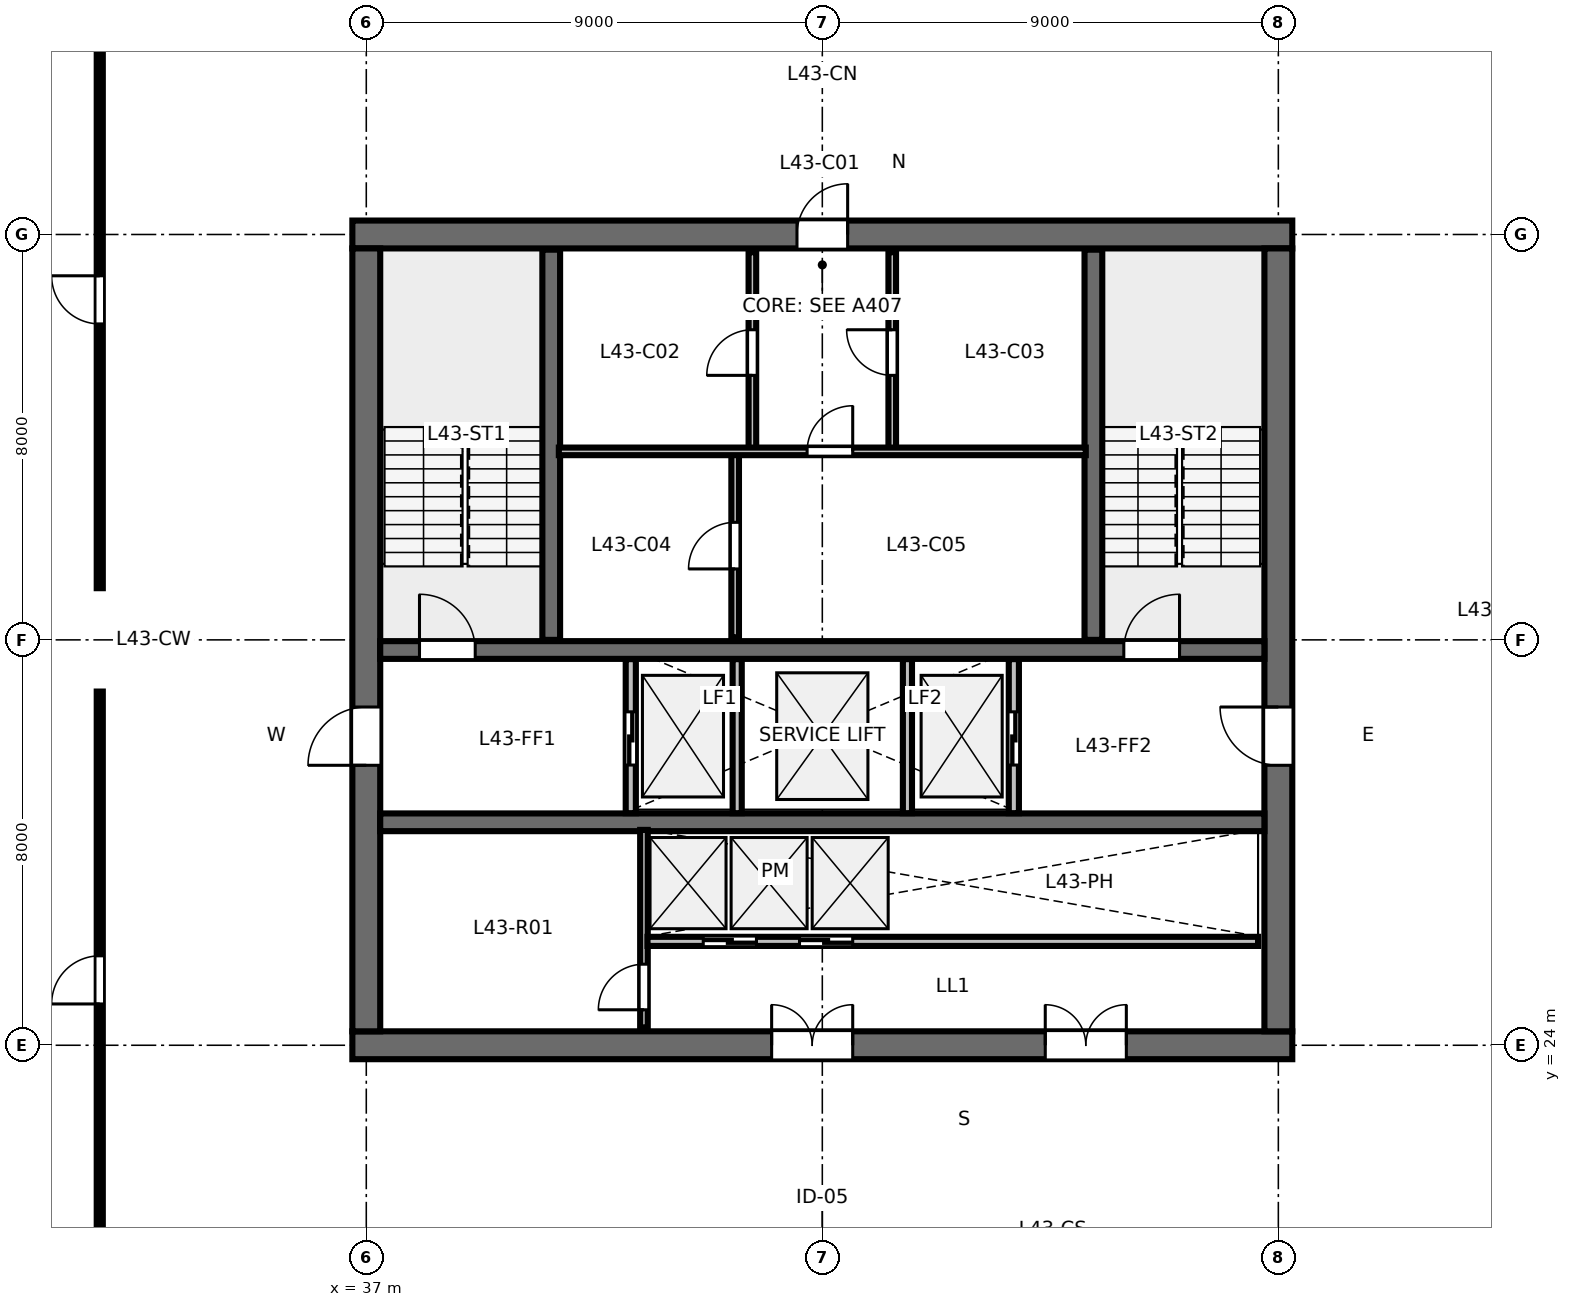
"""IFC4 building model, lengths in metres.
Left out: names, types, materials, properties, quantities, classifications, styles, units other than length and angle.
Written with IfcOpenShell. Run it as: python <this file> out.ifc"""

import sys

from ifc_helpers import new_model, si_unit, direction, frame, frame_2d, origin, place, context, subcontext, project, spatial, rectangle, extrude, element, fill, save


model = new_model("IFC4")
c1 = context("Model", 3, precision=1e-05, world=origin(), true_north=direction((0.0, 1.0)))
c2 = subcontext(c1, "Body", "Model", "MODEL_VIEW")
j1 = project(units=[si_unit("LENGTHUNIT", "METRE"), si_unit("PLANEANGLEUNIT", "RADIAN")], contexts=[c1])
p1 = place(None, origin())
s1 = spatial("IfcSite", under=j1, at=p1, CompositionType="ELEMENT")
p2 = place(p1, origin())
s2 = spatial("IfcBuilding", under=s1, at=p2, CompositionType="ELEMENT")
p3 = place(p2, frame((0.0, 0.0, 163.6)))
s3 = spatial("IfcBuildingStorey", under=s2, at=p3, CompositionType="ELEMENT", Elevation=163.6)
p4 = place(p3, frame((36.725, 24.0, 0.0), z_axis=(0.0, 0.0, 1.0), x_axis=(1.0, 0.0, 0.0)))
e1 = element("IfcWall", 1, at=p4, inside=s3, PredefinedType="SHEAR", context=c2, shape_type="SweptSolid", body=[
    extrude(rectangle(XDim=18.55, YDim=0.55, at=frame_2d((9.275, 0.0))), origin(), (0.0, 0.0, 1.0), 3.28),
])
p5 = place(p4, frame((8.275, 0.0, 0.0)))
e2 = element("IfcOpeningElement", 2, at=p5, cuts=e1, PredefinedType="OPENING", context=c2, shape_type="SweptSolid", body=[
    extrude(rectangle(XDim=1.6, YDim=2.15, at=frame_2d((0.8, 1.075))), frame((0.0, 0.285, 0.0), z_axis=(0.0, -1.0, 0.0), x_axis=(1.0, 0.0, 0.0)), (0.0, 0.0, 1.0), 0.57),
])
p6 = place(p4, frame((13.675, 0.0, 0.0)))
e3 = element("IfcOpeningElement", 3, at=p6, cuts=e1, PredefinedType="OPENING", context=c2, shape_type="SweptSolid", body=[
    extrude(rectangle(XDim=1.6, YDim=2.15, at=frame_2d((0.8, 1.075))), frame((0.0, 0.285, 0.0), z_axis=(0.0, -1.0, 0.0), x_axis=(1.0, 0.0, 0.0)), (0.0, 0.0, 1.0), 0.57),
])
p7 = place(p3, frame((36.725, 40.0, 0.0), z_axis=(0.0, 0.0, 1.0), x_axis=(1.0, 0.0, 0.0)))
e4 = element("IfcWall", 4, at=p7, inside=s3, PredefinedType="SHEAR", context=c2, shape_type="SweptSolid", body=[
    extrude(rectangle(XDim=18.55, YDim=0.55, at=frame_2d((9.275, 0.0))), origin(), (0.0, 0.0, 1.0), 3.28),
])
p8 = place(p7, frame((8.775, 0.0, 0.0)))
e5 = element("IfcOpeningElement", 5, at=p8, cuts=e4, PredefinedType="OPENING", context=c2, shape_type="SweptSolid", body=[
    extrude(rectangle(XDim=1.0, YDim=2.15, at=frame_2d((0.5, 1.075))), frame((0.0, 0.285, 0.0), z_axis=(0.0, -1.0, 0.0), x_axis=(1.0, 0.0, 0.0)), (0.0, 0.0, 1.0), 0.57),
])
p9 = place(p3, frame((37.0, 24.275, 0.0), z_axis=(0.0, 0.0, 1.0), x_axis=(0.0, 1.0, 0.0)))
e6 = element("IfcWall", 6, at=p9, inside=s3, PredefinedType="SHEAR", context=c2, shape_type="SweptSolid", body=[
    extrude(rectangle(XDim=15.45, YDim=0.55, at=frame_2d((7.725, 0.0))), origin(), (0.0, 0.0, 1.0), 3.28),
])
p10 = place(p9, frame((5.25, 0.0, 0.0)))
e7 = element("IfcOpeningElement", 7, at=p10, cuts=e6, PredefinedType="OPENING", context=c2, shape_type="SweptSolid", body=[
    extrude(rectangle(XDim=1.15, YDim=2.15, at=frame_2d((0.575, 1.075))), frame((0.0, 0.285, 0.0), z_axis=(0.0, -1.0, 0.0), x_axis=(1.0, 0.0, 0.0)), (0.0, 0.0, 1.0), 0.57),
])
p11 = place(p3, frame((55.0, 24.275, 0.0), z_axis=(0.0, 0.0, 1.0), x_axis=(0.0, 1.0, 0.0)))
e8 = element("IfcWall", 8, at=p11, inside=s3, PredefinedType="SHEAR", context=c2, shape_type="SweptSolid", body=[
    extrude(rectangle(XDim=15.45, YDim=0.55, at=frame_2d((7.725, 0.0))), origin(), (0.0, 0.0, 1.0), 3.28),
])
p12 = place(p11, frame((5.25, 0.0, 0.0)))
e9 = element("IfcOpeningElement", 9, at=p12, cuts=e8, PredefinedType="OPENING", context=c2, shape_type="SweptSolid", body=[
    extrude(rectangle(XDim=1.15, YDim=2.15, at=frame_2d((0.575, 1.075))), frame((0.0, 0.285, 0.0), z_axis=(0.0, -1.0, 0.0), x_axis=(1.0, 0.0, 0.0)), (0.0, 0.0, 1.0), 0.57),
])
p13 = place(p3, frame((37.275, 31.8, 0.0), z_axis=(0.0, 0.0, 1.0), x_axis=(1.0, 0.0, 0.0)))
e10 = element("IfcWall", 10, at=p13, inside=s3, PredefinedType="SHEAR", context=c2, shape_type="SweptSolid", body=[
    extrude(rectangle(XDim=17.45, YDim=0.35, at=frame_2d((8.725, 0.0))), origin(), (0.0, 0.0, 1.0), 3.28),
])
p14 = place(p13, frame((0.775, 0.0, 0.0)))
e11 = element("IfcOpeningElement", 11, at=p14, cuts=e10, PredefinedType="OPENING", context=c2, shape_type="SweptSolid", body=[
    extrude(rectangle(XDim=1.1, YDim=2.15, at=frame_2d((0.55, 1.075))), frame((0.0, 0.185, 0.0), z_axis=(0.0, -1.0, 0.0), x_axis=(1.0, 0.0, 0.0)), (0.0, 0.0, 1.0), 0.37),
])
p15 = place(p13, frame((14.675, 0.0, 0.0)))
e12 = element("IfcOpeningElement", 12, at=p15, cuts=e10, PredefinedType="OPENING", context=c2, shape_type="SweptSolid", body=[
    extrude(rectangle(XDim=1.1, YDim=2.15, at=frame_2d((0.55, 1.075))), frame((0.0, 0.185, 0.0), z_axis=(0.0, -1.0, 0.0), x_axis=(1.0, 0.0, 0.0)), (0.0, 0.0, 1.0), 0.37),
])
p16 = place(p3, frame((37.275, 28.4, 0.0), z_axis=(0.0, 0.0, 1.0), x_axis=(1.0, 0.0, 0.0)))
e13 = element("IfcWall", 13, at=p16, inside=s3, PredefinedType="SHEAR", context=c2, shape_type="SweptSolid", body=[
    extrude(rectangle(XDim=17.45, YDim=0.35, at=frame_2d((8.725, 0.0))), origin(), (0.0, 0.0, 1.0), 3.28),
])
for number, where, z_axis, x_axis in (
    (14, (40.65, 32.0, 0.0), (0.0, 0.0, 1.0), (0.0, 1.0, 0.0)),
    (15, (51.35, 32.0, 0.0), (0.0, 0.0, 1.0), (0.0, 1.0, 0.0)),
):
    element("IfcWall", number, at=place(p3, frame(where, z_axis=z_axis, x_axis=x_axis)), inside=s3, PredefinedType="SHEAR", context=c2, shape_type="SweptSolid", body=[
        extrude(rectangle(XDim=7.7, YDim=0.35, at=frame_2d((3.85, 0.0))), origin(), (0.0, 0.0, 1.0), 3.6),
    ])
p17 = place(p3, frame((44.62, 35.72, 0.0), z_axis=(0.0, 0.0, 1.0), x_axis=(0.0, 1.0, 0.0)))
e16 = element("IfcWall", 16, at=p17, inside=s3, PredefinedType="PARTITIONING", context=c2, shape_type="SweptSolid", body=[
    extrude(rectangle(XDim=3.93, YDim=0.15, at=frame_2d((1.965, 0.0))), origin(), (0.0, 0.0, 1.0), 3.28),
])
p18 = place(p17, frame((1.5, 0.0, 0.0)))
e17 = element("IfcOpeningElement", 17, at=p18, cuts=e16, PredefinedType="OPENING", context=c2, shape_type="SweptSolid", body=[
    extrude(rectangle(XDim=0.9, YDim=2.15, at=frame_2d((0.45, 1.075))), frame((0.0, 0.085, 0.0), z_axis=(0.0, -1.0, 0.0), x_axis=(1.0, 0.0, 0.0)), (0.0, 0.0, 1.0), 0.17),
])
p19 = place(p3, frame((47.38, 35.72, 0.0), z_axis=(0.0, 0.0, 1.0), x_axis=(0.0, 1.0, 0.0)))
e18 = element("IfcWall", 18, at=p19, inside=s3, PredefinedType="PARTITIONING", context=c2, shape_type="SweptSolid", body=[
    extrude(rectangle(XDim=3.93, YDim=0.15, at=frame_2d((1.965, 0.0))), origin(), (0.0, 0.0, 1.0), 3.28),
])
p20 = place(p19, frame((1.5, 0.0, 0.0)))
e19 = element("IfcOpeningElement", 19, at=p20, cuts=e18, PredefinedType="OPENING", context=c2, shape_type="SweptSolid", body=[
    extrude(rectangle(XDim=0.9, YDim=2.15, at=frame_2d((0.45, 1.075))), frame((0.0, 0.085, 0.0), z_axis=(0.0, -1.0, 0.0), x_axis=(1.0, 0.0, 0.0)), (0.0, 0.0, 1.0), 0.17),
])
p21 = place(p3, frame((44.28, 32.05, 0.0), z_axis=(0.0, 0.0, 1.0), x_axis=(0.0, 1.0, 0.0)))
e20 = element("IfcWall", 20, at=p21, inside=s3, PredefinedType="PARTITIONING", context=c2, shape_type="SweptSolid", body=[
    extrude(rectangle(XDim=3.67, YDim=0.15, at=frame_2d((1.835, 0.0))), origin(), (0.0, 0.0, 1.0), 3.28),
])
p22 = place(p21, frame((1.35, 0.0, 0.0)))
e21 = element("IfcOpeningElement", 21, at=p22, cuts=e20, PredefinedType="OPENING", context=c2, shape_type="SweptSolid", body=[
    extrude(rectangle(XDim=0.92, YDim=2.15, at=frame_2d((0.46, 1.075))), frame((0.0, 0.085, 0.0), z_axis=(0.0, -1.0, 0.0), x_axis=(1.0, 0.0, 0.0)), (0.0, 0.0, 1.0), 0.17),
])
p23 = place(p3, frame((40.8, 35.72, 0.0), z_axis=(0.0, 0.0, 1.0), x_axis=(1.0, 0.0, 0.0)))
e22 = element("IfcWall", 22, at=p23, inside=s3, PredefinedType="PARTITIONING", context=c2, shape_type="SweptSolid", body=[
    extrude(rectangle(XDim=10.4, YDim=0.15, at=frame_2d((5.2, 0.0))), origin(), (0.0, 0.0, 1.0), 3.28),
])
p24 = place(p23, frame((4.9, 0.0, 0.0)))
e23 = element("IfcOpeningElement", 23, at=p24, cuts=e22, PredefinedType="OPENING", context=c2, shape_type="SweptSolid", body=[
    extrude(rectangle(XDim=0.9, YDim=2.15, at=frame_2d((0.45, 1.075))), frame((0.0, 0.085, 0.0), z_axis=(0.0, -1.0, 0.0), x_axis=(1.0, 0.0, 0.0)), (0.0, 0.0, 1.0), 0.17),
])
p25 = place(p3, frame((42.22, 28.58, 0.0), z_axis=(0.0, 0.0, 1.0), x_axis=(0.0, 1.0, 0.0)))
e24 = element("IfcWall", 24, at=p25, inside=s3, PredefinedType="PARTITIONING", context=c2, shape_type="SweptSolid", body=[
    extrude(rectangle(XDim=3.04, YDim=0.2, at=frame_2d((1.52, 0.0))), origin(), (0.0, 0.0, 1.0), 3.28),
])
p26 = place(p25, frame((0.95, 0.0, 0.0)))
e25 = element("IfcOpeningElement", 25, at=p26, cuts=e24, PredefinedType="OPENING", context=c2, shape_type="SweptSolid", body=[
    extrude(rectangle(XDim=1.05, YDim=2.15, at=frame_2d((0.525, 1.075))), frame((0.0, 0.11, 0.0), z_axis=(0.0, -1.0, 0.0), x_axis=(1.0, 0.0, 0.0)), (0.0, 0.0, 1.0), 0.22),
])
p27 = place(p3, frame((49.78, 28.58, 0.0), z_axis=(0.0, 0.0, 1.0), x_axis=(0.0, 1.0, 0.0)))
e26 = element("IfcWall", 26, at=p27, inside=s3, PredefinedType="PARTITIONING", context=c2, shape_type="SweptSolid", body=[
    extrude(rectangle(XDim=3.04, YDim=0.2, at=frame_2d((1.52, 0.0))), origin(), (0.0, 0.0, 1.0), 3.28),
])
p28 = place(p27, frame((0.95, 0.0, 0.0)))
e27 = element("IfcOpeningElement", 27, at=p28, cuts=e26, PredefinedType="OPENING", context=c2, shape_type="SweptSolid", body=[
    extrude(rectangle(XDim=1.05, YDim=2.15, at=frame_2d((0.525, 1.075))), frame((0.0, 0.11, 0.0), z_axis=(0.0, -1.0, 0.0), x_axis=(1.0, 0.0, 0.0)), (0.0, 0.0, 1.0), 0.22),
])
for number, where, z_axis, x_axis in (
    (28, (44.32, 28.58, 0.0), (0.0, 0.0, 1.0), (0.0, 1.0, 0.0)),
    (29, (47.68, 28.58, 0.0), (0.0, 0.0, 1.0), (0.0, 1.0, 0.0)),
):
    element("IfcWall", number, at=place(p3, frame(where, z_axis=z_axis, x_axis=x_axis)), inside=s3, PredefinedType="PARTITIONING", context=c2, shape_type="SweptSolid", body=[
        extrude(rectangle(XDim=3.04, YDim=0.18, at=frame_2d((1.52, 0.0))), origin(), (0.0, 0.0, 1.0), 3.28),
    ])
p29 = place(p3, frame((42.48, 24.35, 0.0), z_axis=(0.0, 0.0, 1.0), x_axis=(0.0, 1.0, 0.0)))
e30 = element("IfcWall", 30, at=p29, inside=s3, PredefinedType="PARTITIONING", context=c2, shape_type="SweptSolid", body=[
    extrude(rectangle(XDim=3.9, YDim=0.15, at=frame_2d((1.95, 0.0))), origin(), (0.0, 0.0, 1.0), 3.28),
])
p30 = place(p29, frame((0.35, 0.0, 0.0)))
e31 = element("IfcOpeningElement", 31, at=p30, cuts=e30, PredefinedType="OPENING", context=c2, shape_type="SweptSolid", body=[
    extrude(rectangle(XDim=0.9, YDim=2.15, at=frame_2d((0.45, 1.075))), frame((0.0, 0.085, 0.0), z_axis=(0.0, -1.0, 0.0), x_axis=(1.0, 0.0, 0.0)), (0.0, 0.0, 1.0), 0.17),
])
p31 = place(p3, frame((42.55, 26.05, 0.0), z_axis=(0.0, 0.0, 1.0), x_axis=(1.0, 0.0, 0.0)))
e32 = element("IfcWall", 32, at=p31, inside=s3, PredefinedType="PARTITIONING", context=c2, shape_type="SweptSolid", body=[
    extrude(rectangle(XDim=12.05, YDim=0.18, at=frame_2d((6.025, 0.0))), origin(), (0.0, 0.0, 1.0), 3.28),
])
p32 = place(p31, frame((1.1, 0.0, 0.0)))
e33 = element("IfcOpeningElement", 33, at=p32, cuts=e32, PredefinedType="OPENING", context=c2, shape_type="SweptSolid", body=[
    extrude(rectangle(XDim=1.05, YDim=2.15, at=frame_2d((0.525, 1.075))), frame((0.0, 0.1, 0.0), z_axis=(0.0, -1.0, 0.0), x_axis=(1.0, 0.0, 0.0)), (0.0, 0.0, 1.0), 0.2),
])
p33 = place(p31, frame((3.0, 0.0, 0.0)))
e34 = element("IfcOpeningElement", 34, at=p33, cuts=e32, PredefinedType="OPENING", context=c2, shape_type="SweptSolid", body=[
    extrude(rectangle(XDim=1.05, YDim=2.15, at=frame_2d((0.525, 1.075))), frame((0.0, 0.1, 0.0), z_axis=(0.0, -1.0, 0.0), x_axis=(1.0, 0.0, 0.0)), (0.0, 0.0, 1.0), 0.2),
])
p34 = place(p3, frame((31.74, 19.4, 0.0), z_axis=(0.0, 0.0, 1.0), x_axis=(0.0, 1.0, 0.0)))
e35 = element("IfcWall", 35, at=p34, inside=s3, PredefinedType="PARTITIONING", context=c2, shape_type="SweptSolid", body=[
    extrude(rectangle(XDim=11.58, YDim=0.12, at=frame_2d((5.79, 0.0))), origin(), (0.0, 0.0, 1.0), 2.56),
])
p35 = place(p34, frame((5.415, 0.0, 0.0)))
e36 = element("IfcOpeningElement", 36, at=p35, cuts=e35, PredefinedType="OPENING", context=c2, shape_type="SweptSolid", body=[
    extrude(rectangle(XDim=0.95, YDim=2.15, at=frame_2d((0.475, 1.075))), frame((0.0, 0.07, 0.0), z_axis=(0.0, -1.0, 0.0), x_axis=(1.0, 0.0, 0.0)), (0.0, 0.0, 1.0), 0.14),
])
p36 = place(p3, frame((31.74, 33.02, 0.0), z_axis=(0.0, 0.0, 1.0), x_axis=(0.0, 1.0, 0.0)))
e37 = element("IfcWall", 37, at=p36, inside=s3, PredefinedType="PARTITIONING", context=c2, shape_type="SweptSolid", body=[
    extrude(rectangle(XDim=11.58, YDim=0.12, at=frame_2d((5.79, 0.0))), origin(), (0.0, 0.0, 1.0), 2.56),
])
p37 = place(p36, frame((5.215, 0.0, 0.0)))
e38 = element("IfcOpeningElement", 38, at=p37, cuts=e37, PredefinedType="OPENING", context=c2, shape_type="SweptSolid", body=[
    extrude(rectangle(XDim=0.95, YDim=2.15, at=frame_2d((0.475, 1.075))), frame((0.0, 0.07, 0.0), z_axis=(0.0, -1.0, 0.0), x_axis=(1.0, 0.0, 0.0)), (0.0, 0.0, 1.0), 0.14),
])
p38 = place(p14, origin())
e39 = element("IfcDoor", 39, at=p38, inside=s3, OperationType="SINGLE_SWING_LEFT", PredefinedType="DOOR", context=c2, shape_type="SweptSolid", body=[
    extrude(rectangle(XDim=1.1, YDim=2.15, at=frame_2d((0.55, 1.075))), frame((0.0, 0.025, 0.0), z_axis=(0.0, -1.0, 0.0), x_axis=(1.0, 0.0, 0.0)), (0.0, 0.0, 1.0), 0.05),
])
fill(e11, e39)
p39 = place(p15, origin())
e40 = element("IfcDoor", 40, at=p39, inside=s3, OperationType="SINGLE_SWING_RIGHT", PredefinedType="DOOR", context=c2, shape_type="SweptSolid", body=[
    extrude(rectangle(XDim=1.1, YDim=2.15, at=frame_2d((0.55, 1.075))), frame((0.0, 0.025, 0.0), z_axis=(0.0, -1.0, 0.0), x_axis=(1.0, 0.0, 0.0)), (0.0, 0.0, 1.0), 0.05),
])
fill(e12, e40)
p40 = place(p8, origin())
e41 = element("IfcDoor", 41, at=p40, inside=s3, OperationType="SINGLE_SWING_RIGHT", PredefinedType="DOOR", context=c2, shape_type="SweptSolid", body=[
    extrude(rectangle(XDim=1.0, YDim=2.15, at=frame_2d((0.5, 1.075))), frame((0.0, 0.025, 0.0), z_axis=(0.0, -1.0, 0.0), x_axis=(1.0, 0.0, 0.0)), (0.0, 0.0, 1.0), 0.05),
])
fill(e5, e41)
p41 = place(p10, origin())
e42 = element("IfcDoor", 42, at=p41, inside=s3, OperationType="SINGLE_SWING_LEFT", PredefinedType="DOOR", context=c2, shape_type="SweptSolid", body=[
    extrude(rectangle(XDim=1.15, YDim=2.15, at=frame_2d((0.575, 1.075))), frame((0.0, 0.025, 0.0), z_axis=(0.0, -1.0, 0.0), x_axis=(1.0, 0.0, 0.0)), (0.0, 0.0, 1.0), 0.05),
])
fill(e7, e42)
p42 = place(p12, origin())
e43 = element("IfcDoor", 43, at=p42, inside=s3, OperationType="SINGLE_SWING_RIGHT", PredefinedType="DOOR", context=c2, shape_type="SweptSolid", body=[
    extrude(rectangle(XDim=1.15, YDim=2.15, at=frame_2d((0.575, 1.075))), frame((0.0, 0.025, 0.0), z_axis=(0.0, -1.0, 0.0), x_axis=(1.0, 0.0, 0.0)), (0.0, 0.0, 1.0), 0.05),
])
fill(e9, e43)
p43 = place(p5, origin())
e44 = element("IfcDoor", 44, at=p43, inside=s3, OperationType="DOUBLE_DOOR_SINGLE_SWING", PredefinedType="DOOR", context=c2, shape_type="SweptSolid", body=[
    extrude(rectangle(XDim=1.6, YDim=2.15, at=frame_2d((0.8, 1.075))), frame((0.0, 0.025, 0.0), z_axis=(0.0, -1.0, 0.0), x_axis=(1.0, 0.0, 0.0)), (0.0, 0.0, 1.0), 0.05),
])
fill(e2, e44)
p44 = place(p6, origin())
e45 = element("IfcDoor", 45, at=p44, inside=s3, OperationType="DOUBLE_DOOR_SINGLE_SWING", PredefinedType="DOOR", context=c2, shape_type="SweptSolid", body=[
    extrude(rectangle(XDim=1.6, YDim=2.15, at=frame_2d((0.8, 1.075))), frame((0.0, 0.025, 0.0), z_axis=(0.0, -1.0, 0.0), x_axis=(1.0, 0.0, 0.0)), (0.0, 0.0, 1.0), 0.05),
])
fill(e3, e45)
p45 = place(p18, origin())
e46 = element("IfcDoor", 46, at=p45, inside=s3, OperationType="SINGLE_SWING_LEFT", PredefinedType="DOOR", context=c2, shape_type="SweptSolid", body=[
    extrude(rectangle(XDim=0.9, YDim=2.15, at=frame_2d((0.45, 1.075))), frame((0.0, 0.025, 0.0), z_axis=(0.0, -1.0, 0.0), x_axis=(1.0, 0.0, 0.0)), (0.0, 0.0, 1.0), 0.05),
])
fill(e17, e46)
p46 = place(p20, origin())
e47 = element("IfcDoor", 47, at=p46, inside=s3, OperationType="SINGLE_SWING_RIGHT", PredefinedType="DOOR", context=c2, shape_type="SweptSolid", body=[
    extrude(rectangle(XDim=0.9, YDim=2.15, at=frame_2d((0.45, 1.075))), frame((0.0, 0.025, 0.0), z_axis=(0.0, -1.0, 0.0), x_axis=(1.0, 0.0, 0.0)), (0.0, 0.0, 1.0), 0.05),
])
fill(e19, e47)
p47 = place(p22, origin())
e48 = element("IfcDoor", 48, at=p47, inside=s3, OperationType="SINGLE_SWING_LEFT", PredefinedType="DOOR", context=c2, shape_type="SweptSolid", body=[
    extrude(rectangle(XDim=0.92, YDim=2.15, at=frame_2d((0.46, 1.075))), frame((0.0, 0.025, 0.0), z_axis=(0.0, -1.0, 0.0), x_axis=(1.0, 0.0, 0.0)), (0.0, 0.0, 1.0), 0.05),
])
fill(e21, e48)
p48 = place(p24, origin())
e49 = element("IfcDoor", 49, at=p48, inside=s3, OperationType="SINGLE_SWING_RIGHT", PredefinedType="DOOR", context=c2, shape_type="SweptSolid", body=[
    extrude(rectangle(XDim=0.9, YDim=2.15, at=frame_2d((0.45, 1.075))), frame((0.0, 0.025, 0.0), z_axis=(0.0, -1.0, 0.0), x_axis=(1.0, 0.0, 0.0)), (0.0, 0.0, 1.0), 0.05),
])
fill(e23, e49)
p49 = place(p26, origin())
e50 = element("IfcDoor", 50, at=p49, inside=s3, OperationType="SLIDING_TO_LEFT", PredefinedType="DOOR", context=c2, shape_type="SweptSolid", body=[
    extrude(rectangle(XDim=1.05, YDim=2.15, at=frame_2d((0.525, 1.075))), frame((0.0, 0.025, 0.0), z_axis=(0.0, -1.0, 0.0), x_axis=(1.0, 0.0, 0.0)), (0.0, 0.0, 1.0), 0.05),
])
fill(e25, e50)
p50 = place(p28, origin())
e51 = element("IfcDoor", 51, at=p50, inside=s3, OperationType="SLIDING_TO_RIGHT", PredefinedType="DOOR", context=c2, shape_type="SweptSolid", body=[
    extrude(rectangle(XDim=1.05, YDim=2.15, at=frame_2d((0.525, 1.075))), frame((0.0, 0.025, 0.0), z_axis=(0.0, -1.0, 0.0), x_axis=(1.0, 0.0, 0.0)), (0.0, 0.0, 1.0), 0.05),
])
fill(e27, e51)
p51 = place(p30, origin())
e52 = element("IfcDoor", 52, at=p51, inside=s3, OperationType="SINGLE_SWING_LEFT", PredefinedType="DOOR", context=c2, shape_type="SweptSolid", body=[
    extrude(rectangle(XDim=0.9, YDim=2.15, at=frame_2d((0.45, 1.075))), frame((0.0, 0.025, 0.0), z_axis=(0.0, -1.0, 0.0), x_axis=(1.0, 0.0, 0.0)), (0.0, 0.0, 1.0), 0.05),
])
fill(e31, e52)
p52 = place(p32, origin())
e53 = element("IfcDoor", 53, at=p52, inside=s3, OperationType="SLIDING_TO_LEFT", PredefinedType="DOOR", context=c2, shape_type="SweptSolid", body=[
    extrude(rectangle(XDim=1.05, YDim=2.15, at=frame_2d((0.525, 1.075))), frame((0.0, 0.025, 0.0), z_axis=(0.0, -1.0, 0.0), x_axis=(1.0, 0.0, 0.0)), (0.0, 0.0, 1.0), 0.05),
])
fill(e33, e53)
p53 = place(p33, origin())
e54 = element("IfcDoor", 54, at=p53, inside=s3, OperationType="SLIDING_TO_RIGHT", PredefinedType="DOOR", context=c2, shape_type="SweptSolid", body=[
    extrude(rectangle(XDim=1.05, YDim=2.15, at=frame_2d((0.525, 1.075))), frame((0.0, 0.025, 0.0), z_axis=(0.0, -1.0, 0.0), x_axis=(1.0, 0.0, 0.0)), (0.0, 0.0, 1.0), 0.05),
])
fill(e34, e54)
p54 = place(p35, origin())
e55 = element("IfcDoor", 55, at=p54, inside=s3, OperationType="SINGLE_SWING_LEFT", PredefinedType="DOOR", context=c2, shape_type="SweptSolid", body=[
    extrude(rectangle(XDim=0.95, YDim=2.15, at=frame_2d((0.475, 1.075))), frame((0.0, 0.025, 0.0), z_axis=(0.0, -1.0, 0.0), x_axis=(1.0, 0.0, 0.0)), (0.0, 0.0, 1.0), 0.05),
])
fill(e36, e55)
p55 = place(p37, origin())
e56 = element("IfcDoor", 56, at=p55, inside=s3, OperationType="SINGLE_SWING_RIGHT", PredefinedType="DOOR", context=c2, shape_type="SweptSolid", body=[
    extrude(rectangle(XDim=0.95, YDim=2.15, at=frame_2d((0.475, 1.075))), frame((0.0, 0.025, 0.0), z_axis=(0.0, -1.0, 0.0), x_axis=(1.0, 0.0, 0.0)), (0.0, 0.0, 1.0), 0.05),
])
fill(e38, e56)
save(model, sys.argv[1])
